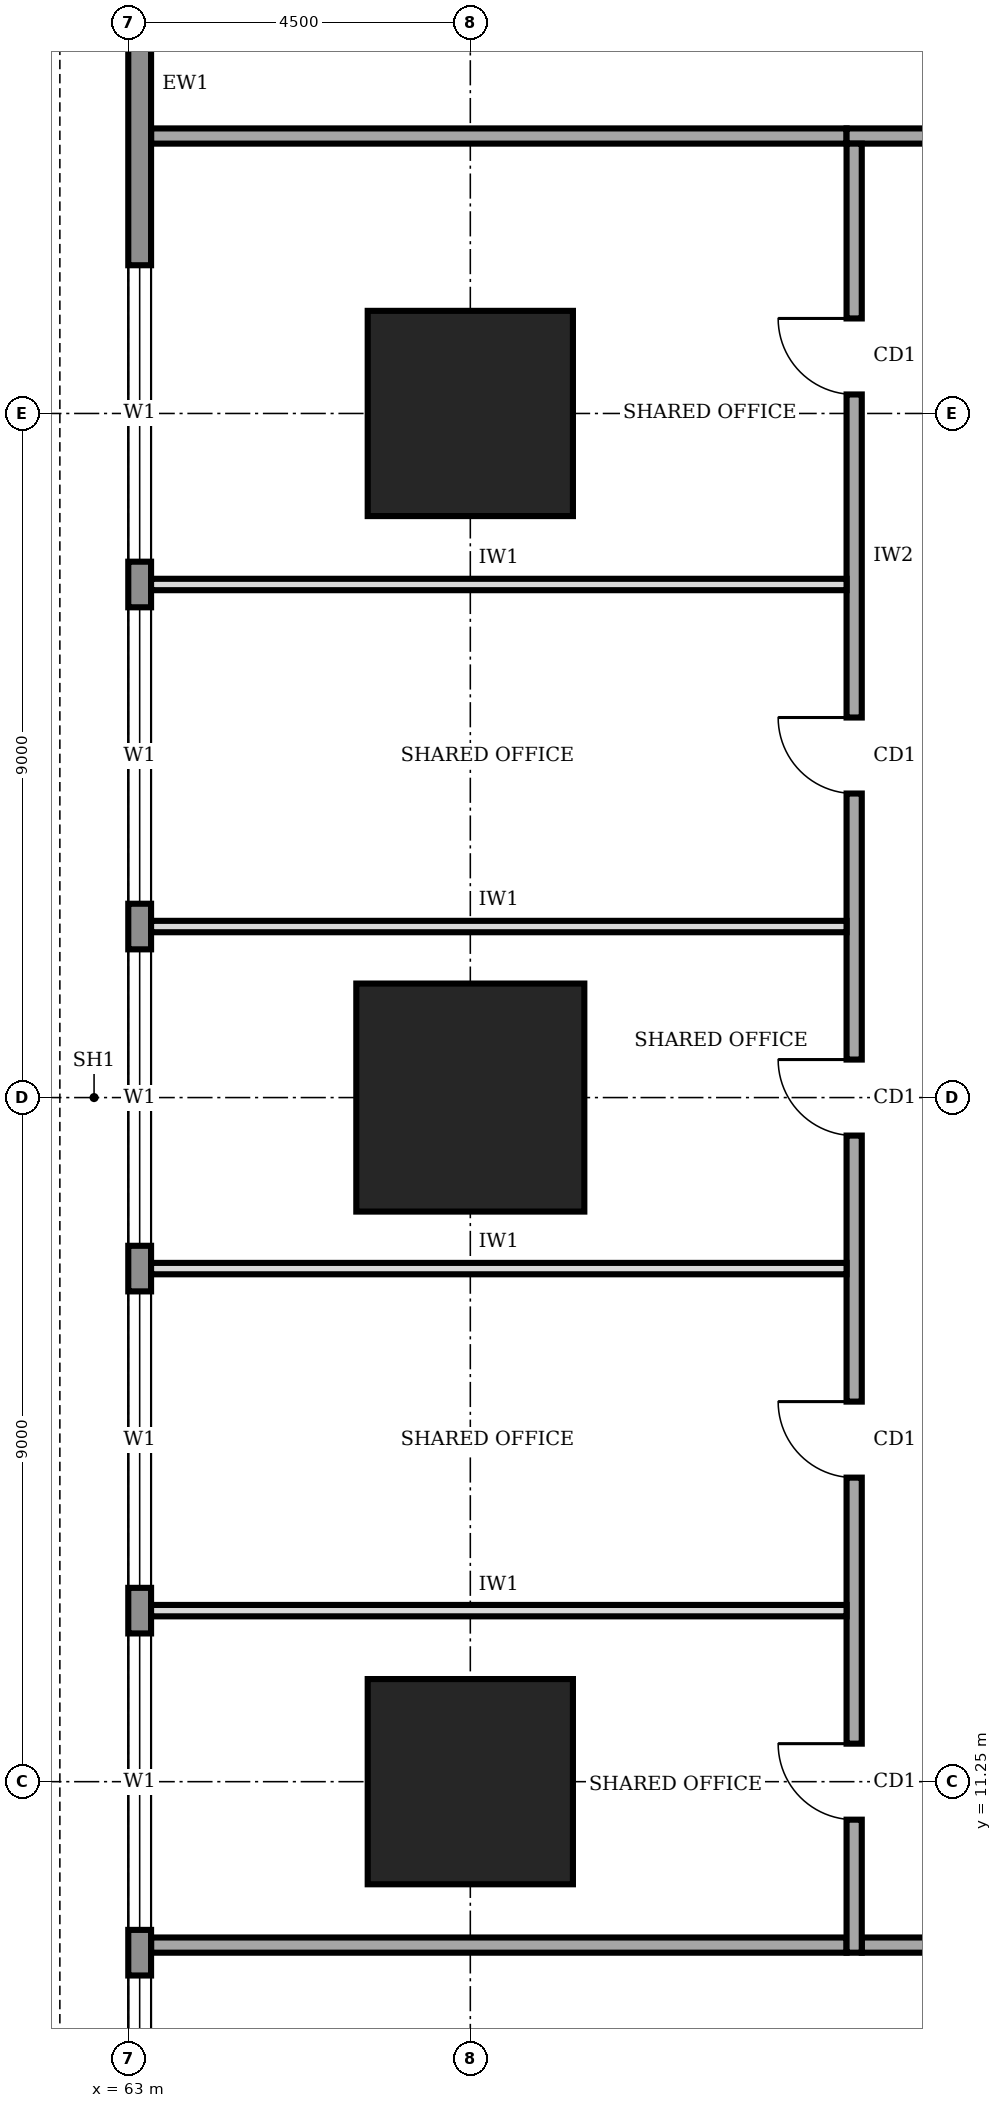
"""IFC4 building model, lengths in metres.
Left out: names, types, materials, properties, quantities, classifications, styles, units other than length and angle.
Written with IfcOpenShell. Run it as: python <this file> out.ifc"""

import sys

from ifc_helpers import new_model, si_unit, direction, frame, frame_2d, origin, origin_2d, place, context, subcontext, project, spatial, rectangle, extrude, element, fill, save


model = new_model("IFC4")
c1 = context("Model", 3, precision=1e-05, world=origin(), true_north=direction((0.0, 1.0)))
c2 = subcontext(c1, "Body", "Model", "MODEL_VIEW")
j1 = project(units=[si_unit("LENGTHUNIT", "METRE"), si_unit("PLANEANGLEUNIT", "RADIAN")], contexts=[c1])
p1 = place(None, origin())
s1 = spatial("IfcSite", under=j1, at=p1, CompositionType="ELEMENT")
p2 = place(p1, origin())
s2 = spatial("IfcBuilding", under=s1, at=p2, CompositionType="ELEMENT")
p3 = place(p2, frame((0.0, 0.0, 33.0)))
s3 = spatial("IfcBuildingStorey", under=s2, at=p3, CompositionType="ELEMENT", Elevation=33.0)
p4 = place(p3, frame((67.5, 11.25, 0.0), z_axis=(0.0, 0.0, 1.0), x_axis=(1.0, 0.0, 0.0)))
e1 = element("IfcColumn", 1, at=p4, inside=s3, PredefinedType="COLUMN", context=c2, shape_type="SweptSolid", body=[
    extrude(rectangle(XDim=2.7, YDim=2.7, at=origin_2d()), origin(), (0.0, 0.0, 1.0), 4.0),
])
p5 = place(p3, frame((67.5, 20.25, 0.0), z_axis=(0.0, 0.0, 1.0), x_axis=(1.0, 0.0, 0.0)))
e2 = element("IfcColumn", 2, at=p5, inside=s3, PredefinedType="COLUMN", context=c2, shape_type="SweptSolid", body=[
    extrude(rectangle(XDim=3.0, YDim=3.0, at=origin_2d()), origin(), (0.0, 0.0, 1.0), 4.0),
])
p6 = place(p3, frame((67.5, 29.25, 0.0), z_axis=(0.0, 0.0, 1.0), x_axis=(1.0, 0.0, 0.0)))
e3 = element("IfcColumn", 3, at=p6, inside=s3, PredefinedType="COLUMN", context=c2, shape_type="SweptSolid", body=[
    extrude(rectangle(XDim=2.7, YDim=2.7, at=origin_2d()), origin(), (0.0, 0.0, 1.0), 4.0),
])
p7 = place(p3, frame((63.15, 35.98, 0.0), z_axis=(0.0, 0.0, 1.0), x_axis=(0.0, -1.0, 0.0)))
e4 = element("IfcWall", 4, at=p7, inside=s3, PredefinedType="STANDARD", context=c2, shape_type="SweptSolid", body=[
    extrude(rectangle(XDim=31.46, YDim=0.3, at=frame_2d((15.73, 0.0))), origin(), (0.0, 0.0, 1.0), 3.75),
])
p8 = place(p7, frame((27.28, 0.0, 0.9)))
e5 = element("IfcOpeningElement", 5, at=p8, cuts=e4, PredefinedType="OPENING", context=c2, shape_type="SweptSolid", body=[
    extrude(rectangle(XDim=3.9, YDim=2.2, at=frame_2d((1.95, 1.1))), frame((0.0, 0.16, 0.0), z_axis=(0.0, -1.0, 0.0), x_axis=(1.0, 0.0, 0.0)), (0.0, 0.0, 1.0), 0.32),
])
p9 = place(p7, frame((22.78, 0.0, 0.9)))
e6 = element("IfcOpeningElement", 6, at=p9, cuts=e4, PredefinedType="OPENING", context=c2, shape_type="SweptSolid", body=[
    extrude(rectangle(XDim=3.9, YDim=2.2, at=frame_2d((1.95, 1.1))), frame((0.0, 0.16, 0.0), z_axis=(0.0, -1.0, 0.0), x_axis=(1.0, 0.0, 0.0)), (0.0, 0.0, 1.0), 0.32),
])
p10 = place(p7, frame((18.28, 0.0, 0.9)))
e7 = element("IfcOpeningElement", 7, at=p10, cuts=e4, PredefinedType="OPENING", context=c2, shape_type="SweptSolid", body=[
    extrude(rectangle(XDim=3.9, YDim=2.2, at=frame_2d((1.95, 1.1))), frame((0.0, 0.16, 0.0), z_axis=(0.0, -1.0, 0.0), x_axis=(1.0, 0.0, 0.0)), (0.0, 0.0, 1.0), 0.32),
])
p11 = place(p7, frame((13.78, 0.0, 0.9)))
e8 = element("IfcOpeningElement", 8, at=p11, cuts=e4, PredefinedType="OPENING", context=c2, shape_type="SweptSolid", body=[
    extrude(rectangle(XDim=3.9, YDim=2.2, at=frame_2d((1.95, 1.1))), frame((0.0, 0.16, 0.0), z_axis=(0.0, -1.0, 0.0), x_axis=(1.0, 0.0, 0.0)), (0.0, 0.0, 1.0), 0.32),
])
p12 = place(p7, frame((9.28, 0.0, 0.9)))
e9 = element("IfcOpeningElement", 9, at=p12, cuts=e4, PredefinedType="OPENING", context=c2, shape_type="SweptSolid", body=[
    extrude(rectangle(XDim=3.9, YDim=2.2, at=frame_2d((1.95, 1.1))), frame((0.0, 0.16, 0.0), z_axis=(0.0, -1.0, 0.0), x_axis=(1.0, 0.0, 0.0)), (0.0, 0.0, 1.0), 0.32),
])
p13 = place(p7, frame((4.78, 0.0, 0.9)))
e10 = element("IfcOpeningElement", 10, at=p13, cuts=e4, PredefinedType="OPENING", context=c2, shape_type="SweptSolid", body=[
    extrude(rectangle(XDim=3.9, YDim=2.2, at=frame_2d((1.95, 1.1))), frame((0.0, 0.16, 0.0), z_axis=(0.0, -1.0, 0.0), x_axis=(1.0, 0.0, 0.0)), (0.0, 0.0, 1.0), 0.32),
])
p14 = place(p3, frame((72.65, 9.1, 0.0), z_axis=(0.0, 0.0, 1.0), x_axis=(1.0, 0.0, 0.0)))
e11 = element("IfcWall", 11, at=p14, inside=s3, PredefinedType="SOLIDWALL", context=c2, shape_type="SweptSolid", body=[
    extrude(rectangle(XDim=16.9, YDim=0.2, at=frame_2d((8.45, 0.0))), origin(), (0.0, 0.0, 1.0), 3.75),
])
p15 = place(p14, frame((0.925, 0.0, 0.0)))
e12 = element("IfcOpeningElement", 12, at=p15, cuts=e11, PredefinedType="OPENING", context=c2, shape_type="SweptSolid", body=[
    extrude(rectangle(XDim=1.8, YDim=2.1, at=frame_2d((0.9, 1.05))), frame((0.0, 0.11, 0.0), z_axis=(0.0, -1.0, 0.0), x_axis=(1.0, 0.0, 0.0)), (0.0, 0.0, 1.0), 0.22),
])
p16 = place(p14, frame((7.85, 0.0, 0.0)))
e13 = element("IfcOpeningElement", 13, at=p16, cuts=e11, PredefinedType="OPENING", context=c2, shape_type="SweptSolid", body=[
    extrude(rectangle(XDim=1.0, YDim=2.1, at=frame_2d((0.5, 1.05))), frame((0.0, 0.11, 0.0), z_axis=(0.0, -1.0, 0.0), x_axis=(1.0, 0.0, 0.0)), (0.0, 0.0, 1.0), 0.22),
])
p17 = place(p14, frame((13.975, 0.0, 0.0)))
e14 = element("IfcOpeningElement", 14, at=p17, cuts=e11, PredefinedType="OPENING", context=c2, shape_type="SweptSolid", body=[
    extrude(rectangle(XDim=1.8, YDim=2.1, at=frame_2d((0.9, 1.05))), frame((0.0, 0.11, 0.0), z_axis=(0.0, -1.0, 0.0), x_axis=(1.0, 0.0, 0.0)), (0.0, 0.0, 1.0), 0.22),
])
p18 = place(p3, frame((89.35, 32.9, 0.0), z_axis=(0.0, 0.0, 1.0), x_axis=(-1.0, 0.0, 0.0)))
e15 = element("IfcWall", 15, at=p18, inside=s3, PredefinedType="SOLIDWALL", context=c2, shape_type="SweptSolid", body=[
    extrude(rectangle(XDim=16.9, YDim=0.2, at=frame_2d((8.45, 0.0))), origin(), (0.0, 0.0, 1.0), 3.75),
])
p19 = place(p18, frame((14.375, 0.0, 0.0)))
e16 = element("IfcOpeningElement", 16, at=p19, cuts=e15, PredefinedType="OPENING", context=c2, shape_type="SweptSolid", body=[
    extrude(rectangle(XDim=1.0, YDim=2.1, at=frame_2d((0.5, 1.05))), frame((0.0, 0.11, 0.0), z_axis=(0.0, -1.0, 0.0), x_axis=(1.0, 0.0, 0.0)), (0.0, 0.0, 1.0), 0.22),
])
p20 = place(p18, frame((7.85, 0.0, 0.0)))
e17 = element("IfcOpeningElement", 17, at=p20, cuts=e15, PredefinedType="OPENING", context=c2, shape_type="SweptSolid", body=[
    extrude(rectangle(XDim=1.0, YDim=2.1, at=frame_2d((0.5, 1.05))), frame((0.0, 0.11, 0.0), z_axis=(0.0, -1.0, 0.0), x_axis=(1.0, 0.0, 0.0)), (0.0, 0.0, 1.0), 0.22),
])
p21 = place(p18, frame((1.325, 0.0, 0.0)))
e18 = element("IfcOpeningElement", 18, at=p21, cuts=e15, PredefinedType="OPENING", context=c2, shape_type="SweptSolid", body=[
    extrude(rectangle(XDim=1.0, YDim=2.1, at=frame_2d((0.5, 1.05))), frame((0.0, 0.11, 0.0), z_axis=(0.0, -1.0, 0.0), x_axis=(1.0, 0.0, 0.0)), (0.0, 0.0, 1.0), 0.22),
])
p22 = place(p3, frame((72.55, 32.8, 0.0), z_axis=(0.0, 0.0, 1.0), x_axis=(0.0, -1.0, 0.0)))
e19 = element("IfcWall", 19, at=p22, inside=s3, PredefinedType="SOLIDWALL", context=c2, shape_type="SweptSolid", body=[
    extrude(rectangle(XDim=23.8, YDim=0.2, at=frame_2d((11.9, 0.0))), origin(), (0.0, 0.0, 1.0), 3.75),
])
p23 = place(p22, frame((21.05, 0.0, 0.0)))
e20 = element("IfcOpeningElement", 20, at=p23, cuts=e19, PredefinedType="OPENING", context=c2, shape_type="SweptSolid", body=[
    extrude(rectangle(XDim=1.0, YDim=2.1, at=frame_2d((0.5, 1.05))), frame((0.0, 0.11, 0.0), z_axis=(0.0, -1.0, 0.0), x_axis=(1.0, 0.0, 0.0)), (0.0, 0.0, 1.0), 0.22),
])
p24 = place(p22, frame((16.55, 0.0, 0.0)))
e21 = element("IfcOpeningElement", 21, at=p24, cuts=e19, PredefinedType="OPENING", context=c2, shape_type="SweptSolid", body=[
    extrude(rectangle(XDim=1.0, YDim=2.1, at=frame_2d((0.5, 1.05))), frame((0.0, 0.11, 0.0), z_axis=(0.0, -1.0, 0.0), x_axis=(1.0, 0.0, 0.0)), (0.0, 0.0, 1.0), 0.22),
])
p25 = place(p22, frame((12.05, 0.0, 0.0)))
e22 = element("IfcOpeningElement", 22, at=p25, cuts=e19, PredefinedType="OPENING", context=c2, shape_type="SweptSolid", body=[
    extrude(rectangle(XDim=1.0, YDim=2.1, at=frame_2d((0.5, 1.05))), frame((0.0, 0.11, 0.0), z_axis=(0.0, -1.0, 0.0), x_axis=(1.0, 0.0, 0.0)), (0.0, 0.0, 1.0), 0.22),
])
p26 = place(p22, frame((7.55, 0.0, 0.0)))
e23 = element("IfcOpeningElement", 23, at=p26, cuts=e19, PredefinedType="OPENING", context=c2, shape_type="SweptSolid", body=[
    extrude(rectangle(XDim=1.0, YDim=2.1, at=frame_2d((0.5, 1.05))), frame((0.0, 0.11, 0.0), z_axis=(0.0, -1.0, 0.0), x_axis=(1.0, 0.0, 0.0)), (0.0, 0.0, 1.0), 0.22),
])
p27 = place(p22, frame((2.3, 0.0, 0.0)))
e24 = element("IfcOpeningElement", 24, at=p27, cuts=e19, PredefinedType="OPENING", context=c2, shape_type="SweptSolid", body=[
    extrude(rectangle(XDim=1.0, YDim=2.1, at=frame_2d((0.5, 1.05))), frame((0.0, 0.11, 0.0), z_axis=(0.0, -1.0, 0.0), x_axis=(1.0, 0.0, 0.0)), (0.0, 0.0, 1.0), 0.22),
])
for number, where, z_axis, x_axis in (
    (25, (63.3, 9.1, 0.0), (0.0, 0.0, 1.0), (1.0, 0.0, 0.0)),
    (26, (63.3, 32.9, 0.0), (0.0, 0.0, 1.0), (1.0, 0.0, 0.0)),
):
    element("IfcWall", number, at=place(p3, frame(where, z_axis=z_axis, x_axis=x_axis)), inside=s3, PredefinedType="SOLIDWALL", context=c2, shape_type="SweptSolid", body=[
        extrude(rectangle(XDim=9.15, YDim=0.2, at=frame_2d((4.575, 0.0))), origin(), (0.0, 0.0, 1.0), 3.75),
    ])
for number, where, z_axis, x_axis in (
    (27, (63.3, 13.5, 0.0), (0.0, 0.0, 1.0), (1.0, 0.0, 0.0)),
    (28, (63.3, 18.0, 0.0), (0.0, 0.0, 1.0), (1.0, 0.0, 0.0)),
    (29, (63.3, 22.5, 0.0), (0.0, 0.0, 1.0), (1.0, 0.0, 0.0)),
    (30, (63.3, 27.0, 0.0), (0.0, 0.0, 1.0), (1.0, 0.0, 0.0)),
):
    element("IfcWall", number, at=place(p3, frame(where, z_axis=z_axis, x_axis=x_axis)), inside=s3, PredefinedType="PARTITIONING", context=c2, shape_type="SweptSolid", body=[
        extrude(rectangle(XDim=9.15, YDim=0.15, at=frame_2d((4.575, 0.0))), origin(), (0.0, 0.0, 1.0), 3.75),
    ])
p28 = place(p8, origin())
e31 = element("IfcWindow", 31, at=p28, inside=s3, PartitioningType="SINGLE_PANEL", PredefinedType="WINDOW", context=c2, shape_type="SweptSolid", body=[
    extrude(rectangle(XDim=3.9, YDim=2.2, at=frame_2d((1.95, 1.1))), frame((0.0, 0.03, 0.0), z_axis=(0.0, -1.0, 0.0), x_axis=(1.0, 0.0, 0.0)), (0.0, 0.0, 1.0), 0.06),
])
fill(e5, e31)
p29 = place(p9, origin())
e32 = element("IfcWindow", 32, at=p29, inside=s3, PartitioningType="SINGLE_PANEL", PredefinedType="WINDOW", context=c2, shape_type="SweptSolid", body=[
    extrude(rectangle(XDim=3.9, YDim=2.2, at=frame_2d((1.95, 1.1))), frame((0.0, 0.03, 0.0), z_axis=(0.0, -1.0, 0.0), x_axis=(1.0, 0.0, 0.0)), (0.0, 0.0, 1.0), 0.06),
])
fill(e6, e32)
p30 = place(p10, origin())
e33 = element("IfcWindow", 33, at=p30, inside=s3, PartitioningType="SINGLE_PANEL", PredefinedType="WINDOW", context=c2, shape_type="SweptSolid", body=[
    extrude(rectangle(XDim=3.9, YDim=2.2, at=frame_2d((1.95, 1.1))), frame((0.0, 0.03, 0.0), z_axis=(0.0, -1.0, 0.0), x_axis=(1.0, 0.0, 0.0)), (0.0, 0.0, 1.0), 0.06),
])
fill(e7, e33)
p31 = place(p11, origin())
e34 = element("IfcWindow", 34, at=p31, inside=s3, PartitioningType="SINGLE_PANEL", PredefinedType="WINDOW", context=c2, shape_type="SweptSolid", body=[
    extrude(rectangle(XDim=3.9, YDim=2.2, at=frame_2d((1.95, 1.1))), frame((0.0, 0.03, 0.0), z_axis=(0.0, -1.0, 0.0), x_axis=(1.0, 0.0, 0.0)), (0.0, 0.0, 1.0), 0.06),
])
fill(e8, e34)
p32 = place(p12, origin())
e35 = element("IfcWindow", 35, at=p32, inside=s3, PartitioningType="SINGLE_PANEL", PredefinedType="WINDOW", context=c2, shape_type="SweptSolid", body=[
    extrude(rectangle(XDim=3.9, YDim=2.2, at=frame_2d((1.95, 1.1))), frame((0.0, 0.03, 0.0), z_axis=(0.0, -1.0, 0.0), x_axis=(1.0, 0.0, 0.0)), (0.0, 0.0, 1.0), 0.06),
])
fill(e9, e35)
p33 = place(p13, origin())
e36 = element("IfcWindow", 36, at=p33, inside=s3, PartitioningType="SINGLE_PANEL", PredefinedType="WINDOW", context=c2, shape_type="SweptSolid", body=[
    extrude(rectangle(XDim=3.9, YDim=2.2, at=frame_2d((1.95, 1.1))), frame((0.0, 0.03, 0.0), z_axis=(0.0, -1.0, 0.0), x_axis=(1.0, 0.0, 0.0)), (0.0, 0.0, 1.0), 0.06),
])
fill(e10, e36)
p34 = place(p23, frame((1.0, 0.0, 0.0), z_axis=(0.0, 0.0, 1.0), x_axis=(-1.0, 0.0, 0.0)))
e37 = element("IfcDoor", 37, at=p34, inside=s3, OperationType="SINGLE_SWING_RIGHT", PredefinedType="DOOR", context=c2, shape_type="SweptSolid", body=[
    extrude(rectangle(XDim=1.0, YDim=2.1, at=frame_2d((0.5, 1.05))), frame((0.0, 0.025, 0.0), z_axis=(0.0, -1.0, 0.0), x_axis=(1.0, 0.0, 0.0)), (0.0, 0.0, 1.0), 0.05),
])
fill(e20, e37)
p35 = place(p24, frame((1.0, 0.0, 0.0), z_axis=(0.0, 0.0, 1.0), x_axis=(-1.0, 0.0, 0.0)))
e38 = element("IfcDoor", 38, at=p35, inside=s3, OperationType="SINGLE_SWING_RIGHT", PredefinedType="DOOR", context=c2, shape_type="SweptSolid", body=[
    extrude(rectangle(XDim=1.0, YDim=2.1, at=frame_2d((0.5, 1.05))), frame((0.0, 0.025, 0.0), z_axis=(0.0, -1.0, 0.0), x_axis=(1.0, 0.0, 0.0)), (0.0, 0.0, 1.0), 0.05),
])
fill(e21, e38)
p36 = place(p25, frame((1.0, 0.0, 0.0), z_axis=(0.0, 0.0, 1.0), x_axis=(-1.0, 0.0, 0.0)))
e39 = element("IfcDoor", 39, at=p36, inside=s3, OperationType="SINGLE_SWING_RIGHT", PredefinedType="DOOR", context=c2, shape_type="SweptSolid", body=[
    extrude(rectangle(XDim=1.0, YDim=2.1, at=frame_2d((0.5, 1.05))), frame((0.0, 0.025, 0.0), z_axis=(0.0, -1.0, 0.0), x_axis=(1.0, 0.0, 0.0)), (0.0, 0.0, 1.0), 0.05),
])
fill(e22, e39)
p37 = place(p26, frame((1.0, 0.0, 0.0), z_axis=(0.0, 0.0, 1.0), x_axis=(-1.0, 0.0, 0.0)))
e40 = element("IfcDoor", 40, at=p37, inside=s3, OperationType="SINGLE_SWING_RIGHT", PredefinedType="DOOR", context=c2, shape_type="SweptSolid", body=[
    extrude(rectangle(XDim=1.0, YDim=2.1, at=frame_2d((0.5, 1.05))), frame((0.0, 0.025, 0.0), z_axis=(0.0, -1.0, 0.0), x_axis=(1.0, 0.0, 0.0)), (0.0, 0.0, 1.0), 0.05),
])
fill(e23, e40)
p38 = place(p27, frame((1.0, 0.0, 0.0), z_axis=(0.0, 0.0, 1.0), x_axis=(-1.0, 0.0, 0.0)))
e41 = element("IfcDoor", 41, at=p38, inside=s3, OperationType="SINGLE_SWING_RIGHT", PredefinedType="DOOR", context=c2, shape_type="SweptSolid", body=[
    extrude(rectangle(XDim=1.0, YDim=2.1, at=frame_2d((0.5, 1.05))), frame((0.0, 0.025, 0.0), z_axis=(0.0, -1.0, 0.0), x_axis=(1.0, 0.0, 0.0)), (0.0, 0.0, 1.0), 0.05),
])
fill(e24, e41)
save(model, sys.argv[1])
